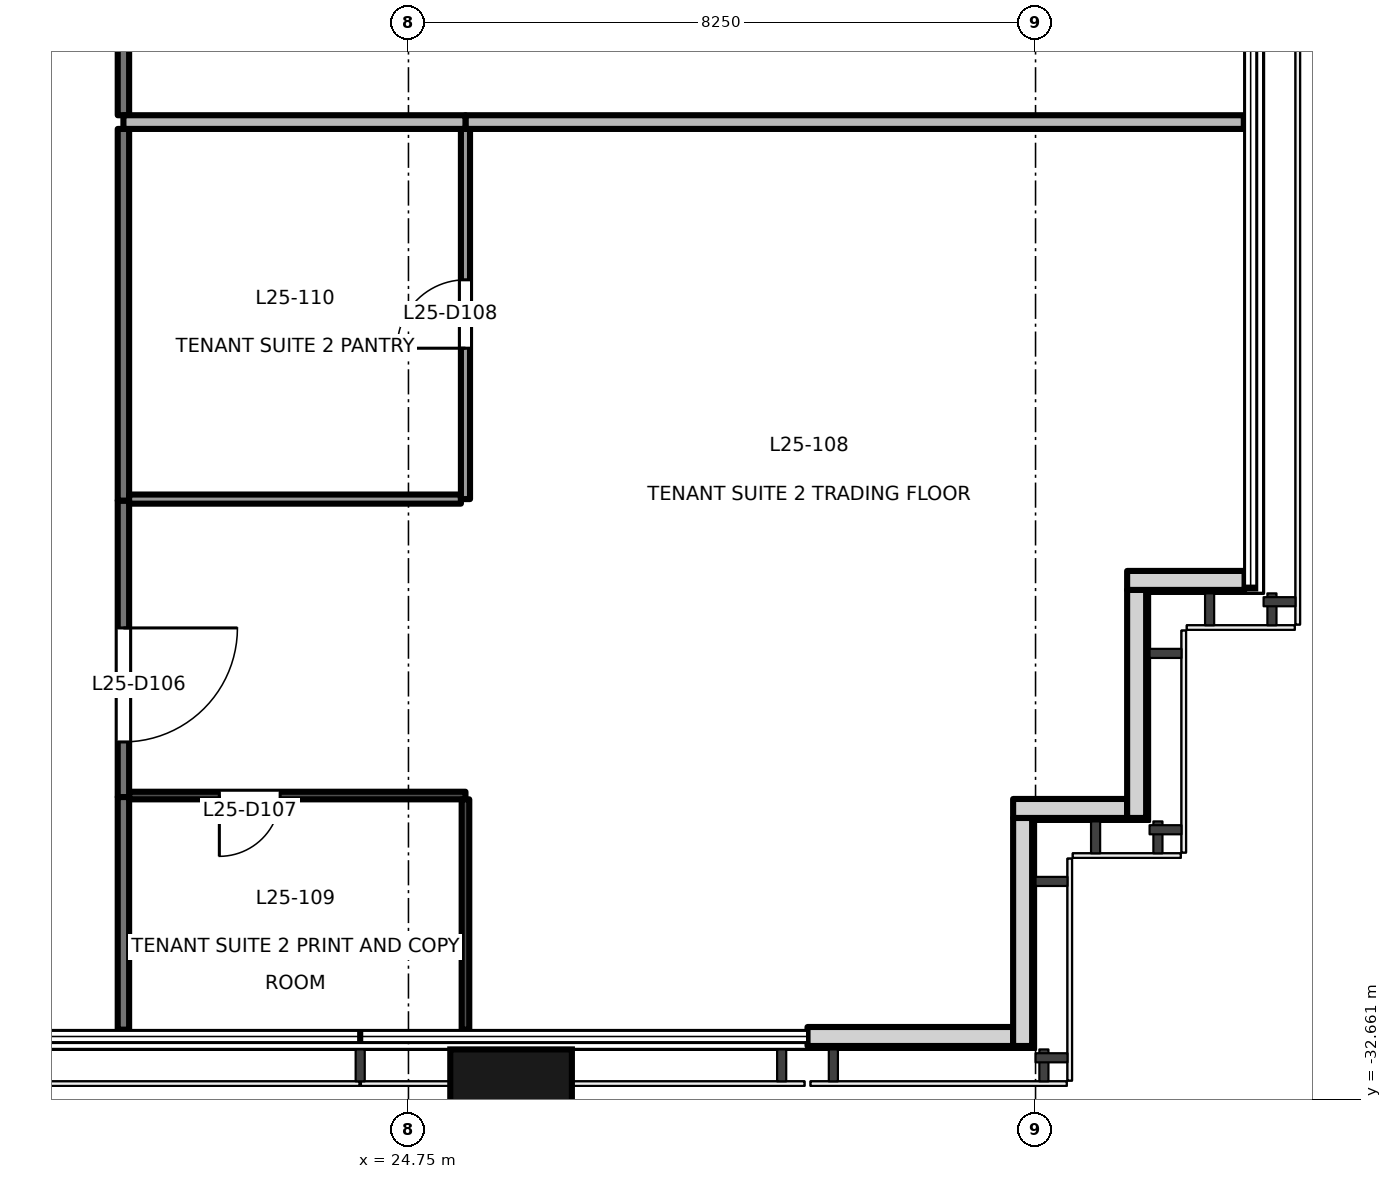
"""IFC4 building model, lengths in metres.
Left out: names, types, materials, properties, quantities, classifications, styles, units other than length and angle.
Written with IfcOpenShell. Run it as: python <this file> out.ifc"""

import sys

from ifc_helpers import new_model, si_unit, direction, frame, frame_2d, origin, origin_2d, place, context, subcontext, project, spatial, rectangle, extrude, element, fill, save


model = new_model("IFC4")
c1 = context("Model", 3, precision=1e-05, world=origin(), true_north=direction((0.0, 1.0)))
c2 = subcontext(c1, "Body", "Model", "MODEL_VIEW")
j1 = project(units=[si_unit("LENGTHUNIT", "METRE"), si_unit("PLANEANGLEUNIT", "RADIAN")], contexts=[c1])
p1 = place(None, origin())
s1 = spatial("IfcSite", under=j1, at=p1, CompositionType="ELEMENT")
p2 = place(p1, origin())
s2 = spatial("IfcBuilding", under=s1, at=p2, CompositionType="ELEMENT")
p3 = place(p2, frame((0.0, 0.0, 111.7)))
s3 = spatial("IfcBuildingStorey", under=s2, at=p3, CompositionType="ELEMENT", Elevation=111.7)
p4 = place(p3, frame((26.1, -32.9, -0.2), z_axis=(0.0, 0.0, 1.0), x_axis=(1.0, 0.0, 0.0)))
e1 = element("IfcColumn", 1, at=p4, inside=s3, PredefinedType="COLUMN", context=c2, shape_type="SweptSolid", body=[
    extrude(rectangle(XDim=1.6, YDim=1.8, at=origin_2d()), origin(), (0.0, 0.0, 1.0), 4.0),
])
p5 = place(p3, frame((30.0, -31.83, 0.0), z_axis=(0.0, 0.0, 1.0), x_axis=(1.0, 0.0, 0.0)))
e2 = element("IfcWall", 2, at=p5, inside=s3, PredefinedType="SOLIDWALL", context=c2, shape_type="SweptSolid", body=[
    extrude(rectangle(XDim=2.705, YDim=0.25, at=frame_2d((1.353, 0.0))), origin(), (0.0, 0.0, 1.0), 3.8),
])
p6 = place(p3, frame((32.83, -31.955, 0.0), z_axis=(0.0, 0.0, 1.0), x_axis=(0.0, 1.0, 0.0)))
e3 = element("IfcWall", 3, at=p6, inside=s3, PredefinedType="SOLIDWALL", context=c2, shape_type="SweptSolid", body=[
    extrude(rectangle(XDim=3.0, YDim=0.25, at=frame_2d((1.5, 0.0))), origin(), (0.0, 0.0, 1.0), 3.8),
])
p7 = place(p3, frame((32.705, -28.83, 0.0), z_axis=(0.0, 0.0, 1.0), x_axis=(1.0, 0.0, 0.0)))
e4 = element("IfcWall", 4, at=p7, inside=s3, PredefinedType="SOLIDWALL", context=c2, shape_type="SweptSolid", body=[
    extrude(rectangle(XDim=1.5, YDim=0.25, at=frame_2d((0.75, 0.0))), origin(), (0.0, 0.0, 1.0), 3.8),
])
p8 = place(p3, frame((34.33, -28.955, 0.0), z_axis=(0.0, 0.0, 1.0), x_axis=(0.0, 1.0, 0.0)))
e5 = element("IfcWall", 5, at=p8, inside=s3, PredefinedType="SOLIDWALL", context=c2, shape_type="SweptSolid", body=[
    extrude(rectangle(XDim=3.0, YDim=0.25, at=frame_2d((1.5, 0.0))), origin(), (0.0, 0.0, 1.0), 3.8),
])
p9 = place(p3, frame((34.205, -25.83, 0.0), z_axis=(0.0, 0.0, 1.0), x_axis=(1.0, 0.0, 0.0)))
e6 = element("IfcWall", 6, at=p9, inside=s3, PredefinedType="SOLIDWALL", context=c2, shape_type="SweptSolid", body=[
    extrude(rectangle(XDim=1.545, YDim=0.25, at=frame_2d((0.772, 0.0))), origin(), (0.0, 0.0, 1.0), 3.8),
])
p10 = place(p3, frame((21.0, -24.78, 0.0), z_axis=(0.0, 0.0, 1.0), x_axis=(0.0, -1.0, 0.0)))
e7 = element("IfcWall", 7, at=p10, inside=s3, PredefinedType="PARTITIONING", context=c2, shape_type="SweptSolid", body=[
    extrude(rectangle(XDim=3.9, YDim=0.15, at=frame_2d((1.95, 0.0))), origin(), (0.0, 0.0, 1.0), 3.8),
])
p11 = place(p10, frame((1.675, 0.0, 0.0)))
e8 = element("IfcOpeningElement", 8, at=p11, cuts=e7, PredefinedType="OPENING", context=c2, shape_type="SweptSolid", body=[
    extrude(rectangle(XDim=1.5, YDim=2.1, at=frame_2d((0.75, 1.05))), frame((0.0, 0.085, 0.0), z_axis=(0.0, -1.0, 0.0), x_axis=(1.0, 0.0, 0.0)), (0.0, 0.0, 1.0), 0.171),
])
p12 = place(p3, frame((21.0, -28.68, 0.0), z_axis=(0.0, 0.0, 1.0), x_axis=(0.0, -1.0, 0.0)))
e9 = element("IfcWall", 9, at=p12, inside=s3, PredefinedType="PARTITIONING", context=c2, shape_type="SweptSolid", body=[
    extrude(rectangle(XDim=3.06, YDim=0.15, at=frame_2d((1.53, 0.0))), origin(), (0.0, 0.0, 1.0), 3.8),
])
p13 = place(p3, frame((21.0, -19.89, 0.0), z_axis=(0.0, 0.0, 1.0), x_axis=(0.0, -1.0, 0.0)))
e10 = element("IfcWall", 10, at=p13, inside=s3, PredefinedType="PARTITIONING", context=c2, shape_type="SweptSolid", body=[
    extrude(rectangle(XDim=4.89, YDim=0.15, at=frame_2d((2.445, 0.0))), origin(), (0.0, 0.0, 1.0), 3.8),
])
p14 = place(p3, frame((21.0, -15.32, 0.0), z_axis=(0.0, 0.0, 1.0), x_axis=(0.0, -1.0, 0.0)))
e11 = element("IfcWall", 11, at=p14, inside=s3, PredefinedType="PARTITIONING", context=c2, shape_type="SweptSolid", body=[
    extrude(rectangle(XDim=4.39, YDim=0.15, at=frame_2d((2.195, 0.0))), origin(), (0.0, 0.0, 1.0), 3.8),
])
p15 = place(p14, frame((1.745, 0.0, 0.0)))
e12 = element("IfcOpeningElement", 12, at=p15, cuts=e11, PredefinedType="OPENING", context=c2, shape_type="SweptSolid", body=[
    extrude(rectangle(XDim=0.9, YDim=2.1, at=frame_2d((0.45, 1.05))), frame((0.0, 0.085, 0.0), z_axis=(0.0, -1.0, 0.0), x_axis=(1.0, 0.0, 0.0)), (0.0, 0.0, 1.0), 0.171),
])
p16 = place(p3, frame((25.5, -28.66, 0.0), z_axis=(0.0, 0.0, 1.0), x_axis=(-1.0, 0.0, 0.0)))
e13 = element("IfcWall", 13, at=p16, inside=s3, PredefinedType="PARTITIONING", context=c2, shape_type="SweptSolid", body=[
    extrude(rectangle(XDim=4.425, YDim=0.1, at=frame_2d((2.212, 0.0))), origin(), (0.0, 0.0, 1.0), 3.8),
])
p17 = place(p16, frame((2.438, 0.0, 0.0)))
e14 = element("IfcOpeningElement", 14, at=p17, cuts=e13, PredefinedType="OPENING", context=c2, shape_type="SweptSolid", body=[
    extrude(rectangle(XDim=0.8, YDim=2.1, at=frame_2d((0.4, 1.05))), frame((0.0, 0.061, 0.0), z_axis=(0.0, -1.0, 0.0), x_axis=(1.0, 0.0, 0.0)), (0.0, 0.0, 1.0), 0.121),
])
p18 = place(p3, frame((25.5, -31.74, 0.0), z_axis=(0.0, 0.0, 1.0), x_axis=(0.0, 1.0, 0.0)))
e15 = element("IfcWall", 15, at=p18, inside=s3, PredefinedType="PARTITIONING", context=c2, shape_type="SweptSolid", body=[
    extrude(rectangle(XDim=3.03, YDim=0.1, at=frame_2d((1.515, 0.0))), origin(), (0.0, 0.0, 1.0), 3.8),
])
p19 = place(p3, frame((21.075, -24.76, 0.0), z_axis=(0.0, 0.0, 1.0), x_axis=(1.0, 0.0, 0.0)))
e16 = element("IfcWall", 16, at=p19, inside=s3, PredefinedType="PARTITIONING", context=c2, shape_type="SweptSolid", body=[
    extrude(rectangle(XDim=4.365, YDim=0.12, at=frame_2d((2.183, 0.0))), origin(), (0.0, 0.0, 1.0), 3.8),
])
p20 = place(p3, frame((25.5, -24.76, 0.0), z_axis=(0.0, 0.0, 1.0), x_axis=(0.0, 1.0, 0.0)))
e17 = element("IfcWall", 17, at=p20, inside=s3, PredefinedType="PARTITIONING", context=c2, shape_type="SweptSolid", body=[
    extrude(rectangle(XDim=4.87, YDim=0.12, at=frame_2d((2.435, 0.0))), origin(), (0.0, 0.0, 1.0), 3.8),
])
p21 = place(p20, frame((1.985, 0.0, 0.0)))
e18 = element("IfcOpeningElement", 18, at=p21, cuts=e17, PredefinedType="OPENING", context=c2, shape_type="SweptSolid", body=[
    extrude(rectangle(XDim=0.9, YDim=2.1, at=frame_2d((0.45, 1.05))), frame((0.0, 0.071, 0.0), z_axis=(0.0, -1.0, 0.0), x_axis=(1.0, 0.0, 0.0)), (0.0, 0.0, 1.0), 0.141),
])
p22 = place(p3, frame((25.5, -19.8, 0.0), z_axis=(0.0, 0.0, 1.0), x_axis=(1.0, 0.0, 0.0)))
e19 = element("IfcWall", 19, at=p22, inside=s3, PredefinedType="PARTITIONING", context=c2, shape_type="SweptSolid", body=[
    extrude(rectangle(XDim=10.24, YDim=0.18, at=frame_2d((5.12, 0.0))), origin(), (0.0, 0.0, 1.0), 3.8),
])
p23 = place(p3, frame((21.0, -19.8, 0.0), z_axis=(0.0, 0.0, 1.0), x_axis=(1.0, 0.0, 0.0)))
e20 = element("IfcWall", 20, at=p23, inside=s3, PredefinedType="PARTITIONING", context=c2, shape_type="SweptSolid", body=[
    extrude(rectangle(XDim=4.5, YDim=0.18, at=frame_2d((2.25, 0.0))), origin(), (0.0, 0.0, 1.0), 3.8),
])
p24 = place(p11, origin())
e21 = element("IfcDoor", 21, at=p24, inside=s3, OperationType="DOUBLE_DOOR_SINGLE_SWING", PredefinedType="DOOR", context=c2, shape_type="SweptSolid", body=[
    extrude(rectangle(XDim=1.5, YDim=2.1, at=frame_2d((0.75, 1.05))), frame((0.0, 0.025, 0.0), z_axis=(0.0, -1.0, 0.0), x_axis=(1.0, 0.0, 0.0)), (0.0, 0.0, 1.0), 0.05),
])
fill(e8, e21)
p25 = place(p17, origin())
e22 = element("IfcDoor", 22, at=p25, inside=s3, OperationType="SINGLE_SWING_RIGHT", PredefinedType="DOOR", context=c2, shape_type="SweptSolid", body=[
    extrude(rectangle(XDim=0.8, YDim=2.1, at=frame_2d((0.4, 1.05))), frame((0.0, 0.025, 0.0), z_axis=(0.0, -1.0, 0.0), x_axis=(1.0, 0.0, 0.0)), (0.0, 0.0, 1.0), 0.05),
])
fill(e14, e22)
p26 = place(p21, origin())
e23 = element("IfcDoor", 23, at=p26, inside=s3, OperationType="SINGLE_SWING_LEFT", PredefinedType="DOOR", context=c2, shape_type="SweptSolid", body=[
    extrude(rectangle(XDim=0.9, YDim=2.1, at=frame_2d((0.45, 1.05))), frame((0.0, 0.025, 0.0), z_axis=(0.0, -1.0, 0.0), x_axis=(1.0, 0.0, 0.0)), (0.0, 0.0, 1.0), 0.05),
])
fill(e18, e23)
save(model, sys.argv[1])
